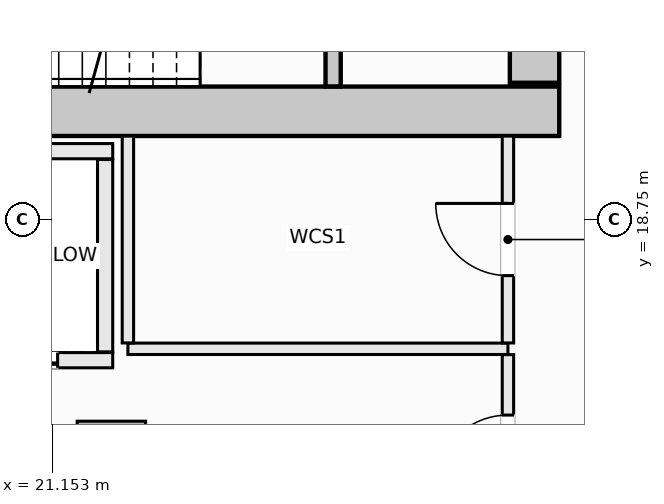
"""IFC4 building model, lengths in metres.
Left out: names, types, materials, properties, quantities, classifications, styles, units other than length and angle.
Written with IfcOpenShell. Run it as: python <this file> out.ifc"""

import sys

from ifc_helpers import new_model, si_unit, direction, frame, frame_2d, origin, origin_2d, place, context, subcontext, project, spatial, rectangle, extrude, element, fill, save


model = new_model("IFC4")
c1 = context("Model", 3, precision=1e-05, world=origin(), true_north=direction((0.0, 1.0)))
c2 = subcontext(c1, "Body", "Model", "MODEL_VIEW")
j1 = project(units=[si_unit("LENGTHUNIT", "METRE"), si_unit("PLANEANGLEUNIT", "RADIAN")], contexts=[c1])
p1 = place(None, origin())
s1 = spatial("IfcSite", under=j1, at=p1, CompositionType="ELEMENT")
p2 = place(p1, origin())
s2 = spatial("IfcBuilding", under=s1, at=p2, CompositionType="ELEMENT")
p3 = place(p2, frame((0.0, 0.0, 163.1)))
s3 = spatial("IfcBuildingStorey", under=s2, at=p3, CompositionType="ELEMENT", Elevation=163.1)
p4 = place(p3, frame((14.175, 20.175, -0.27), z_axis=(0.0, 0.0, 1.0), x_axis=(1.0, 0.0, 0.0)))
e1 = element("IfcWall", 1, at=p4, inside=s3, PredefinedType="SHEAR", context=c2, shape_type="SweptSolid", body=[
    extrude(rectangle(XDim=13.65, YDim=0.65, at=frame_2d((6.825, 0.0))), origin(), (0.0, 0.0, 1.0), 3.4),
])
p5 = place(p3, frame((27.5, 20.55, -0.27), z_axis=(0.0, 0.0, 1.0), x_axis=(0.0, 1.0, 0.0)))
e2 = element("IfcWall", 2, at=p5, inside=s3, PredefinedType="SHEAR", context=c2, shape_type="SweptSolid", body=[
    extrude(rectangle(XDim=1.5, YDim=0.65, at=frame_2d((0.75, 0.0))), origin(), (0.0, 0.0, 1.0), 3.4),
])
p6 = place(p3, frame((21.932, 15.648, -0.27), z_axis=(0.0, 0.0, 1.0), x_axis=(1.0, 0.0, 0.0)))
e3 = element("IfcColumn", 3, at=p6, inside=s3, PredefinedType="COLUMN", context=c2, shape_type="SweptSolid", body=[
    extrude(rectangle(XDim=0.9, YDim=0.9, at=origin_2d()), origin(), (0.0, 0.0, 1.0), 3.4),
])
p7 = place(p3, frame((24.85, 20.502, -0.27), z_axis=(0.0, 0.0, 1.0), x_axis=(0.0, 1.0, 0.0)))
e4 = element("IfcWall", 4, at=p7, inside=s3, PredefinedType="SHEAR", context=c2, shape_type="SweptSolid", body=[
    extrude(rectangle(XDim=3.038, YDim=0.2, at=frame_2d((1.519, 0.0))), origin(), (0.0, 0.0, 1.0), 3.4),
])
p8 = place(p7, frame((0.969, 0.0, 0.27)))
e5 = element("IfcOpeningElement", 5, at=p8, cuts=e4, PredefinedType="OPENING", context=c2, shape_type="SweptSolid", body=[
    extrude(rectangle(XDim=1.1, YDim=2.15, at=frame_2d((0.55, 1.075))), frame((0.0, 0.11, 0.0), z_axis=(0.0, -1.0, 0.0), x_axis=(1.0, 0.0, 0.0)), (0.0, 0.0, 1.0), 0.22),
])
p9 = place(p3, frame((19.4, 19.65, 0.0), z_axis=(0.0, 0.0, 1.0), x_axis=(1.0, 0.0, 0.0)))
e6 = element("IfcWall", 6, at=p9, inside=s3, PredefinedType="SOLIDWALL", context=c2, shape_type="SweptSolid", body=[
    extrude(rectangle(XDim=2.55, YDim=0.2, at=frame_2d((1.275, 0.0))), origin(), (0.0, 0.0, 1.0), 3.13),
])
p10 = place(p3, frame((19.4, 16.9, 0.0), z_axis=(0.0, 0.0, 1.0), x_axis=(1.0, 0.0, 0.0)))
e7 = element("IfcWall", 7, at=p10, inside=s3, PredefinedType="SOLIDWALL", context=c2, shape_type="SweptSolid", body=[
    extrude(rectangle(XDim=2.55, YDim=0.2, at=frame_2d((1.275, 0.0))), origin(), (0.0, 0.0, 1.0), 3.13),
])
p11 = place(p10, frame((0.725, 0.0, 0.0)))
e8 = element("IfcOpeningElement", 8, at=p11, cuts=e7, PredefinedType="OPENING", context=c2, shape_type="SweptSolid", body=[
    extrude(rectangle(XDim=1.1, YDim=2.2, at=frame_2d((0.55, 1.1))), frame((0.0, 0.11, 0.0), z_axis=(0.0, -1.0, 0.0), x_axis=(1.0, 0.0, 0.0)), (0.0, 0.0, 1.0), 0.22),
])
p12 = place(p3, frame((21.85, 17.01, 0.0), z_axis=(0.0, 0.0, 1.0), x_axis=(0.0, 1.0, 0.0)))
e9 = element("IfcWall", 9, at=p12, inside=s3, PredefinedType="SOLIDWALL", context=c2, shape_type="SweptSolid", body=[
    extrude(rectangle(XDim=2.53, YDim=0.2, at=frame_2d((1.265, 0.0))), origin(), (0.0, 0.0, 1.0), 3.13),
])
p13 = place(p3, frame((22.15, 17.05, 0.0), z_axis=(0.0, 0.0, 1.0), x_axis=(1.0, 0.0, 0.0)))
e10 = element("IfcWall", 10, at=p13, inside=s3, PredefinedType="PARTITIONING", context=c2, shape_type="SweptSolid", body=[
    extrude(rectangle(XDim=5.0, YDim=0.15, at=frame_2d((2.5, 0.0))), origin(), (0.0, 0.0, 1.0), 3.13),
])
p14 = place(p3, frame((22.15, 17.127, 0.0), z_axis=(0.0, 0.0, 1.0), x_axis=(0.0, 1.0, 0.0)))
e11 = element("IfcWall", 11, at=p14, inside=s3, PredefinedType="PARTITIONING", context=c2, shape_type="SweptSolid", body=[
    extrude(rectangle(XDim=2.721, YDim=0.15, at=frame_2d((1.36, 0.0))), origin(), (0.0, 0.0, 1.0), 3.13),
])
p15 = place(p3, frame((27.15, 12.056, 0.0), z_axis=(0.0, 0.0, 1.0), x_axis=(0.0, 1.0, 0.0)))
e12 = element("IfcWall", 12, at=p15, inside=s3, PredefinedType="PARTITIONING", context=c2, shape_type="SweptSolid", body=[
    extrude(rectangle(XDim=4.917, YDim=0.15, at=frame_2d((2.458, 0.0))), origin(), (0.0, 0.0, 1.0), 3.13),
])
p16 = place(p15, frame((3.172, 0.0, 0.0)))
e13 = element("IfcOpeningElement", 13, at=p16, cuts=e12, PredefinedType="OPENING", context=c2, shape_type="SweptSolid", body=[
    extrude(rectangle(XDim=0.95, YDim=2.1, at=frame_2d((0.475, 1.05))), frame((0.0, 0.085, 0.0), z_axis=(0.0, -1.0, 0.0), x_axis=(1.0, 0.0, 0.0)), (0.0, 0.0, 1.0), 0.17),
])
p17 = place(p15, frame((1.125, 0.0, 0.0)))
e14 = element("IfcOpeningElement", 14, at=p17, cuts=e12, PredefinedType="OPENING", context=c2, shape_type="SweptSolid", body=[
    extrude(rectangle(XDim=0.95, YDim=2.1, at=frame_2d((0.475, 1.05))), frame((0.0, 0.085, 0.0), z_axis=(0.0, -1.0, 0.0), x_axis=(1.0, 0.0, 0.0)), (0.0, 0.0, 1.0), 0.17),
])
p18 = place(p3, frame((27.15, 17.127, 0.0), z_axis=(0.0, 0.0, 1.0), x_axis=(0.0, 1.0, 0.0)))
e15 = element("IfcWall", 15, at=p18, inside=s3, PredefinedType="PARTITIONING", context=c2, shape_type="SweptSolid", body=[
    extrude(rectangle(XDim=2.721, YDim=0.15, at=frame_2d((1.36, 0.0))), origin(), (0.0, 0.0, 1.0), 3.13),
])
p19 = place(p18, frame((0.885, 0.0, 0.0)))
e16 = element("IfcOpeningElement", 16, at=p19, cuts=e15, PredefinedType="OPENING", context=c2, shape_type="SweptSolid", body=[
    extrude(rectangle(XDim=0.95, YDim=2.1, at=frame_2d((0.475, 1.05))), frame((0.0, 0.085, 0.0), z_axis=(0.0, -1.0, 0.0), x_axis=(1.0, 0.0, 0.0)), (0.0, 0.0, 1.0), 0.17),
])
p20 = place(p11, origin())
e17 = element("IfcDoor", 17, at=p20, inside=s3, OperationType="SLIDING_TO_LEFT", PredefinedType="DOOR", context=c2, shape_type="SweptSolid", body=[
    extrude(rectangle(XDim=1.1, YDim=2.2, at=frame_2d((0.55, 1.1))), frame((0.0, 0.025, 0.0), z_axis=(0.0, -1.0, 0.0), x_axis=(1.0, 0.0, 0.0)), (0.0, 0.0, 1.0), 0.05),
])
fill(e8, e17)
p21 = place(p19, origin())
e18 = element("IfcDoor", 18, at=p21, inside=s3, OperationType="SINGLE_SWING_RIGHT", PredefinedType="DOOR", context=c2, shape_type="SweptSolid", body=[
    extrude(rectangle(XDim=0.95, YDim=2.1, at=frame_2d((0.475, 1.05))), frame((0.0, 0.025, 0.0), z_axis=(0.0, -1.0, 0.0), x_axis=(1.0, 0.0, 0.0)), (0.0, 0.0, 1.0), 0.05),
])
fill(e16, e18)
p22 = place(p16, origin())
e19 = element("IfcDoor", 19, at=p22, inside=s3, OperationType="SINGLE_SWING_LEFT", PredefinedType="DOOR", context=c2, shape_type="SweptSolid", body=[
    extrude(rectangle(XDim=0.95, YDim=2.1, at=frame_2d((0.475, 1.05))), frame((0.0, 0.025, 0.0), z_axis=(0.0, -1.0, 0.0), x_axis=(1.0, 0.0, 0.0)), (0.0, 0.0, 1.0), 0.05),
])
fill(e13, e19)
save(model, sys.argv[1])
